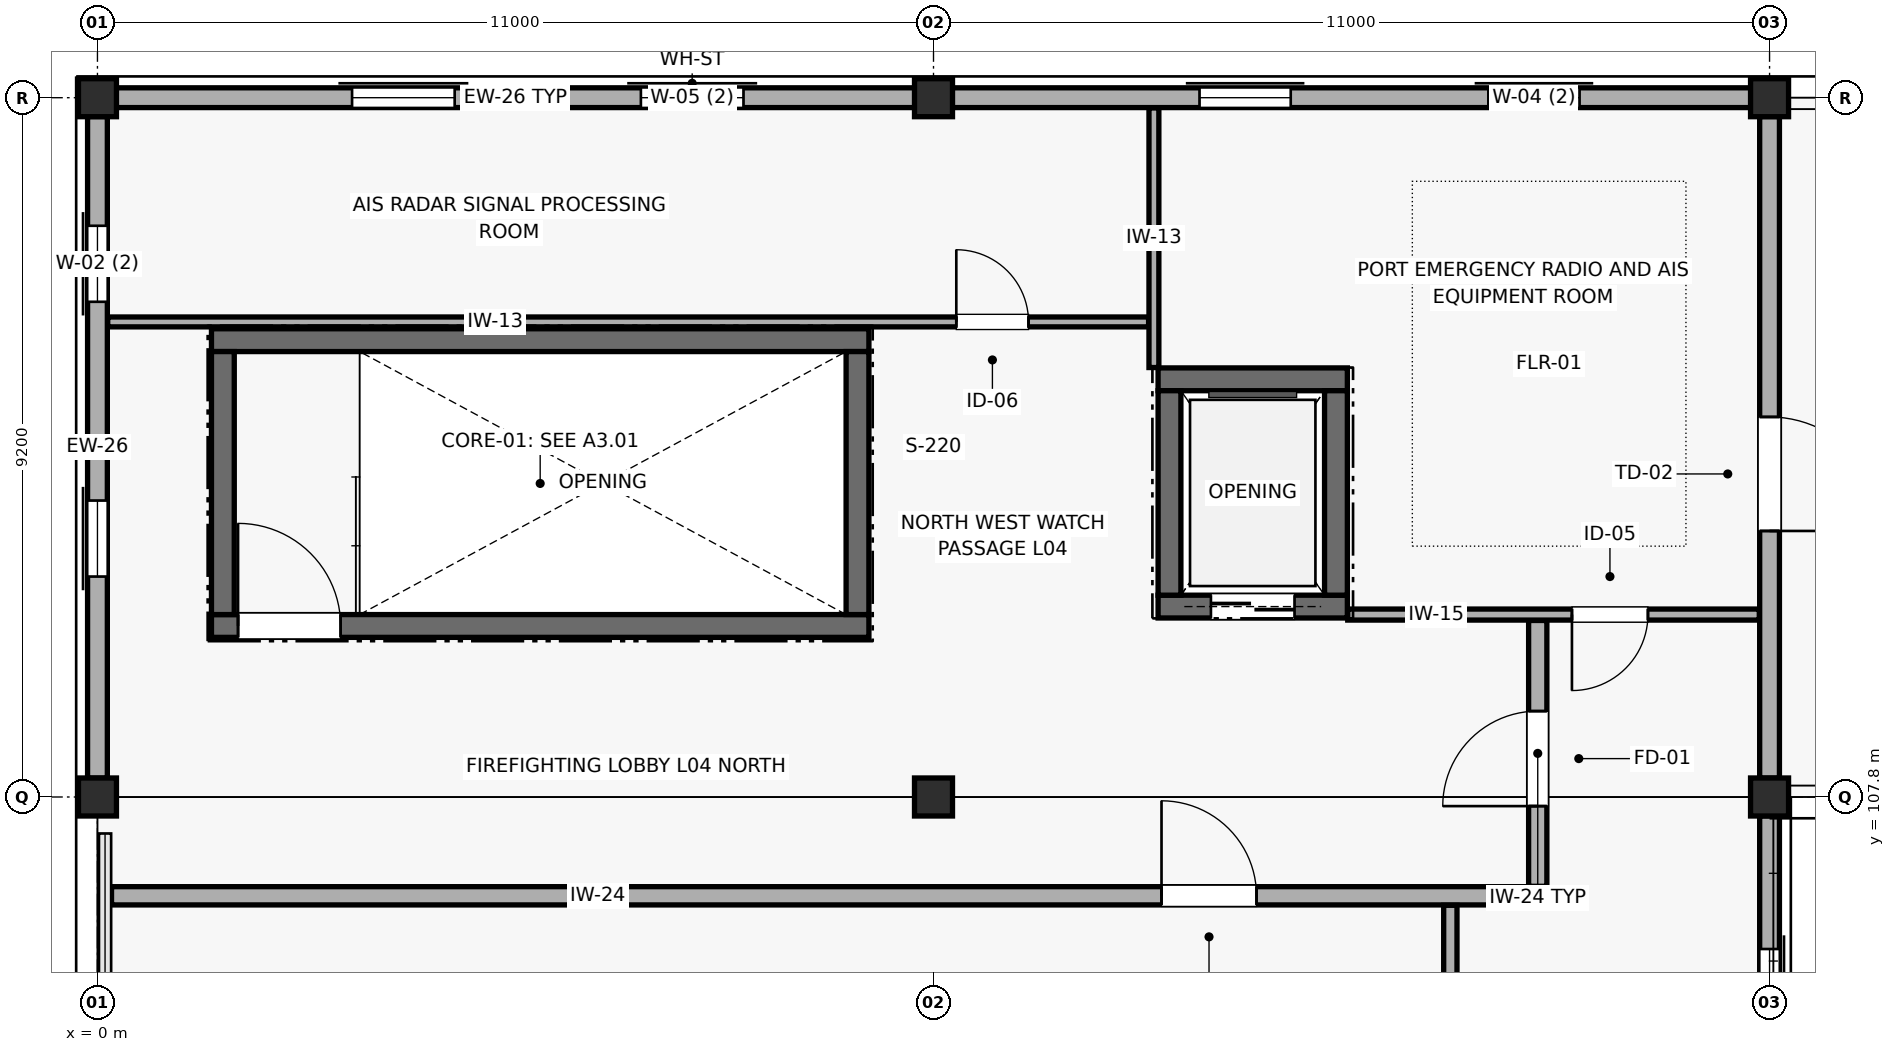
"""IFC4 building model, lengths in metres.
Left out: names, types, materials, properties, quantities, classifications, styles, units other than length and angle.
Written with IfcOpenShell. Run it as: python <this file> out.ifc"""

import sys

from ifc_helpers import new_model, si_unit, direction, frame, frame_2d, origin, origin_2d, place, context, subcontext, project, spatial, rectangle, extrude, element, fill, save


model = new_model("IFC4")
c1 = context("Model", 3, precision=1e-05, world=origin(), true_north=direction((0.0, 1.0)))
c2 = subcontext(c1, "Body", "Model", "MODEL_VIEW")
j1 = project(units=[si_unit("LENGTHUNIT", "METRE"), si_unit("PLANEANGLEUNIT", "RADIAN")], contexts=[c1])
p1 = place(None, origin())
s1 = spatial("IfcSite", under=j1, at=p1, CompositionType="ELEMENT")
p2 = place(p1, origin())
s2 = spatial("IfcBuilding", under=s1, at=p2, CompositionType="ELEMENT")
p3 = place(p2, frame((0.0, 0.0, 18.3)))
s3 = spatial("IfcBuildingStorey", under=s2, at=p3, CompositionType="ELEMENT", Elevation=18.3)
for number, where, z_axis, x_axis in (
    (1, (0.0, 107.8, 0.0), (0.0, 0.0, 1.0), (1.0, 0.0, 0.0)),
    (2, (0.0, 117.0, 0.0), (0.0, 0.0, 1.0), (1.0, 0.0, 0.0)),
    (3, (11.0, 107.8, 0.0), (0.0, 0.0, 1.0), (1.0, 0.0, 0.0)),
    (4, (11.0, 117.0, 0.0), (0.0, 0.0, 1.0), (1.0, 0.0, 0.0)),
    (5, (22.0, 107.8, 0.0), (0.0, 0.0, 1.0), (1.0, 0.0, 0.0)),
    (6, (22.0, 117.0, 0.0), (0.0, 0.0, 1.0), (1.0, 0.0, 0.0)),
):
    element("IfcColumn", number, at=place(p3, frame(where, z_axis=z_axis, x_axis=x_axis)), inside=s3, PredefinedType="COLUMN", context=c2, shape_type="SweptSolid", body=[
        extrude(rectangle(XDim=0.5, YDim=0.5, at=origin_2d()), origin(), (0.0, 0.0, 1.0), 4.2),
    ])
p4 = place(p3, frame((10.752, 117.0, 0.0), z_axis=(0.0, 0.0, 1.0), x_axis=(-1.0, 0.0, 0.0)))
e7 = element("IfcWall", 7, at=p4, inside=s3, PredefinedType="SOLIDWALL", context=c2, shape_type="SweptSolid", body=[
    extrude(rectangle(XDim=10.504, YDim=0.26, at=frame_2d((5.252, 0.0))), origin(), (0.0, 0.0, 1.0), 3.447),
])
p5 = place(p4, frame((2.252, 0.0, 0.95)))
e8 = element("IfcOpeningElement", 8, at=p5, cuts=e7, PredefinedType="OPENING", context=c2, shape_type="SweptSolid", body=[
    extrude(rectangle(XDim=1.35, YDim=2.1, at=frame_2d((0.675, 1.05))), frame((0.0, 0.14, 0.0), z_axis=(0.0, -1.0, 0.0), x_axis=(1.0, 0.0, 0.0)), (0.0, 0.0, 1.0), 0.28),
])
p6 = place(p4, frame((6.052, 0.0, 0.95)))
e9 = element("IfcOpeningElement", 9, at=p6, cuts=e7, PredefinedType="OPENING", context=c2, shape_type="SweptSolid", body=[
    extrude(rectangle(XDim=1.35, YDim=2.1, at=frame_2d((0.675, 1.05))), frame((0.0, 0.14, 0.0), z_axis=(0.0, -1.0, 0.0), x_axis=(1.0, 0.0, 0.0)), (0.0, 0.0, 1.0), 0.28),
])
p7 = place(p3, frame((21.752, 117.0, 0.0), z_axis=(0.0, 0.0, 1.0), x_axis=(-1.0, 0.0, 0.0)))
e10 = element("IfcWall", 10, at=p7, inside=s3, PredefinedType="SOLIDWALL", context=c2, shape_type="SweptSolid", body=[
    extrude(rectangle(XDim=10.504, YDim=0.26, at=frame_2d((5.252, 0.0))), origin(), (0.0, 0.0, 1.0), 3.447),
])
p8 = place(p7, frame((2.252, 0.0, 0.95)))
e11 = element("IfcOpeningElement", 11, at=p8, cuts=e10, PredefinedType="OPENING", context=c2, shape_type="SweptSolid", body=[
    extrude(rectangle(XDim=1.2, YDim=2.1, at=frame_2d((0.6, 1.05))), frame((0.0, 0.14, 0.0), z_axis=(0.0, -1.0, 0.0), x_axis=(1.0, 0.0, 0.0)), (0.0, 0.0, 1.0), 0.28),
])
p9 = place(p7, frame((6.052, 0.0, 0.95)))
e12 = element("IfcOpeningElement", 12, at=p9, cuts=e10, PredefinedType="OPENING", context=c2, shape_type="SweptSolid", body=[
    extrude(rectangle(XDim=1.2, YDim=2.1, at=frame_2d((0.6, 1.05))), frame((0.0, 0.14, 0.0), z_axis=(0.0, -1.0, 0.0), x_axis=(1.0, 0.0, 0.0)), (0.0, 0.0, 1.0), 0.28),
])
p10 = place(p3, frame((0.0, 116.752, 0.0), z_axis=(0.0, 0.0, 1.0), x_axis=(0.0, -1.0, 0.0)))
e13 = element("IfcWall", 13, at=p10, inside=s3, PredefinedType="SOLIDWALL", context=c2, shape_type="SweptSolid", body=[
    extrude(rectangle(XDim=8.704, YDim=0.26, at=frame_2d((4.352, 0.0))), origin(), (0.0, 0.0, 1.0), 3.449),
])
p11 = place(p10, frame((1.437, 0.0, 0.95)))
e14 = element("IfcOpeningElement", 14, at=p11, cuts=e13, PredefinedType="OPENING", context=c2, shape_type="SweptSolid", body=[
    extrude(rectangle(XDim=1.0, YDim=1.8, at=frame_2d((0.5, 0.9))), frame((0.0, 0.14, 0.0), z_axis=(0.0, -1.0, 0.0), x_axis=(1.0, 0.0, 0.0)), (0.0, 0.0, 1.0), 0.28),
])
p12 = place(p10, frame((5.052, 0.0, 0.95)))
e15 = element("IfcOpeningElement", 15, at=p12, cuts=e13, PredefinedType="OPENING", context=c2, shape_type="SweptSolid", body=[
    extrude(rectangle(XDim=1.0, YDim=1.8, at=frame_2d((0.5, 0.9))), frame((0.0, 0.14, 0.0), z_axis=(0.0, -1.0, 0.0), x_axis=(1.0, 0.0, 0.0)), (0.0, 0.0, 1.0), 0.28),
])
p13 = place(p3, frame((22.0, 98.848, 0.0), z_axis=(0.0, 0.0, 1.0), x_axis=(0.0, 1.0, 0.0)))
e16 = element("IfcWall", 16, at=p13, inside=s3, PredefinedType="SOLIDWALL", context=c2, shape_type="SweptSolid", body=[
    extrude(rectangle(XDim=8.704, YDim=0.26, at=frame_2d((4.352, 0.0))), origin(), (0.0, 0.0, 1.0), 3.449),
])
p14 = place(p13, frame((2.352, 0.0, 0.95)))
e17 = element("IfcOpeningElement", 17, at=p14, cuts=e16, PredefinedType="OPENING", context=c2, shape_type="SweptSolid", body=[
    extrude(rectangle(XDim=1.5, YDim=1.8, at=frame_2d((0.75, 0.9))), frame((0.0, 0.14, 0.0), z_axis=(0.0, -1.0, 0.0), x_axis=(1.0, 0.0, 0.0)), (0.0, 0.0, 1.0), 0.28),
])
p15 = place(p13, frame((5.452, 0.0, 0.95)))
e18 = element("IfcOpeningElement", 18, at=p15, cuts=e16, PredefinedType="OPENING", context=c2, shape_type="SweptSolid", body=[
    extrude(rectangle(XDim=1.5, YDim=1.8, at=frame_2d((0.75, 0.9))), frame((0.0, 0.14, 0.0), z_axis=(0.0, -1.0, 0.0), x_axis=(1.0, 0.0, 0.0)), (0.0, 0.0, 1.0), 0.28),
])
p16 = place(p3, frame((22.0, 108.048, 0.0), z_axis=(0.0, 0.0, 1.0), x_axis=(0.0, 1.0, 0.0)))
e19 = element("IfcWall", 19, at=p16, inside=s3, PredefinedType="SOLIDWALL", context=c2, shape_type="SweptSolid", body=[
    extrude(rectangle(XDim=8.704, YDim=0.26, at=frame_2d((4.352, 0.0))), origin(), (0.0, 0.0, 1.0), 3.449),
])
p17 = place(p16, frame((3.252, 0.0, 0.0)))
e20 = element("IfcOpeningElement", 20, at=p17, cuts=e19, PredefinedType="OPENING", context=c2, shape_type="SweptSolid", body=[
    extrude(rectangle(XDim=1.5, YDim=2.25, at=frame_2d((0.75, 1.125))), frame((0.0, 0.14, 0.0), z_axis=(0.0, -1.0, 0.0), x_axis=(1.0, 0.0, 0.0)), (0.0, 0.0, 1.0), 0.28),
])
p18 = place(p3, frame((1.5, 110.05, 0.0), z_axis=(0.0, 0.0, 1.0), x_axis=(1.0, 0.0, 0.0)))
e21 = element("IfcWall", 21, at=p18, inside=s3, PredefinedType="SHEAR", context=c2, shape_type="SweptSolid", body=[
    extrude(rectangle(XDim=8.65, YDim=0.3, at=frame_2d((4.325, 0.0))), origin(), (0.0, 0.0, 1.0), 3.99),
])
p19 = place(p18, frame((0.35, 0.0, 0.0)))
e22 = element("IfcOpeningElement", 22, at=p19, cuts=e21, PredefinedType="OPENING", context=c2, shape_type="SweptSolid", body=[
    extrude(rectangle(XDim=1.35, YDim=2.2, at=frame_2d((0.675, 1.1))), frame((0.0, 0.16, 0.0), z_axis=(0.0, -1.0, 0.0), x_axis=(1.0, 0.0, 0.0)), (0.0, 0.0, 1.0), 0.32),
])
p20 = place(p3, frame((10.15, 113.81, 0.0), z_axis=(0.0, 0.0, 1.0), x_axis=(-1.0, 0.0, 0.0)))
e23 = element("IfcWall", 23, at=p20, inside=s3, PredefinedType="SHEAR", context=c2, shape_type="SweptSolid", body=[
    extrude(rectangle(XDim=8.65, YDim=0.3, at=frame_2d((4.325, 0.0))), origin(), (0.0, 0.0, 1.0), 3.99),
])
for number, where, z_axis, x_axis in (
    (24, (1.65, 113.66, 0.0), (0.0, 0.0, 1.0), (0.0, -1.0, 0.0)),
    (25, (10.0, 110.2, 0.0), (0.0, 0.0, 1.0), (0.0, 1.0, 0.0)),
):
    element("IfcWall", number, at=place(p3, frame(where, z_axis=z_axis, x_axis=x_axis)), inside=s3, PredefinedType="SHEAR", context=c2, shape_type="SweptSolid", body=[
        extrude(rectangle(XDim=3.46, YDim=0.3, at=frame_2d((1.73, 0.0))), origin(), (0.0, 0.0, 1.0), 3.99),
    ])
p21 = place(p3, frame((13.955, 110.305, 0.0), z_axis=(0.0, 0.0, 1.0), x_axis=(1.0, 0.0, 0.0)))
e26 = element("IfcWall", 26, at=p21, inside=s3, PredefinedType="SHEAR", context=c2, shape_type="SweptSolid", body=[
    extrude(rectangle(XDim=2.49, YDim=0.3, at=frame_2d((1.245, 0.0))), origin(), (0.0, 0.0, 1.0), 3.99),
])
p22 = place(p21, frame((0.695, 0.0, 0.0)))
e27 = element("IfcOpeningElement", 27, at=p22, cuts=e26, PredefinedType="OPENING", context=c2, shape_type="SweptSolid", body=[
    extrude(rectangle(XDim=1.1, YDim=2.15, at=frame_2d((0.55, 1.075))), frame((0.0, 0.16, 0.0), z_axis=(0.0, -1.0, 0.0), x_axis=(1.0, 0.0, 0.0)), (0.0, 0.0, 1.0), 0.32),
])
p23 = place(p3, frame((16.445, 113.295, 0.0), z_axis=(0.0, 0.0, 1.0), x_axis=(-1.0, 0.0, 0.0)))
e28 = element("IfcWall", 28, at=p23, inside=s3, PredefinedType="SHEAR", context=c2, shape_type="SweptSolid", body=[
    extrude(rectangle(XDim=2.49, YDim=0.3, at=frame_2d((1.245, 0.0))), origin(), (0.0, 0.0, 1.0), 3.99),
])
for number, where, z_axis, x_axis in (
    (29, (14.105, 113.145, 0.0), (0.0, 0.0, 1.0), (0.0, -1.0, 0.0)),
    (30, (16.295, 110.455, 0.0), (0.0, 0.0, 1.0), (0.0, 1.0, 0.0)),
):
    element("IfcWall", number, at=place(p3, frame(where, z_axis=z_axis, x_axis=x_axis)), inside=s3, PredefinedType="SHEAR", context=c2, shape_type="SweptSolid", body=[
        extrude(rectangle(XDim=2.69, YDim=0.3, at=frame_2d((1.345, 0.0))), origin(), (0.0, 0.0, 1.0), 3.99),
    ])
p24 = place(p3, frame((0.185, 106.5, 0.0), z_axis=(0.0, 0.0, 1.0), x_axis=(1.0, 0.0, 0.0)))
e31 = element("IfcWall", 31, at=p24, inside=s3, PredefinedType="PARTITIONING", context=c2, shape_type="SweptSolid", body=[
    extrude(rectangle(XDim=18.64, YDim=0.24, at=frame_2d((9.32, 0.0))), origin(), (0.0, 0.0, 1.0), 3.449),
])
p25 = place(p24, frame((13.815, 0.0, 0.0)))
e32 = element("IfcOpeningElement", 32, at=p25, cuts=e31, PredefinedType="OPENING", context=c2, shape_type="SweptSolid", body=[
    extrude(rectangle(XDim=1.25, YDim=2.2, at=frame_2d((0.625, 1.1))), frame((0.0, 0.13, 0.0), z_axis=(0.0, -1.0, 0.0), x_axis=(1.0, 0.0, 0.0)), (0.0, 0.0, 1.0), 0.26),
])
p26 = place(p3, frame((17.8, 80.625, 0.0), z_axis=(0.0, 0.0, 1.0), x_axis=(0.0, 1.0, 0.0)))
e33 = element("IfcWall", 33, at=p26, inside=s3, PredefinedType="PARTITIONING", context=c2, shape_type="SweptSolid", body=[
    extrude(rectangle(XDim=25.75, YDim=0.175, at=frame_2d((12.875, 0.0))), origin(), (0.0, 0.0, 1.0), 3.447),
])
p27 = place(p26, frame((6.505, 0.0, 0.0)))
e34 = element("IfcOpeningElement", 34, at=p27, cuts=e33, PredefinedType="OPENING", context=c2, shape_type="SweptSolid", body=[
    extrude(rectangle(XDim=1.05, YDim=2.2, at=frame_2d((0.525, 1.1))), frame((0.0, 0.097, 0.0), z_axis=(0.0, -1.0, 0.0), x_axis=(1.0, 0.0, 0.0)), (0.0, 0.0, 1.0), 0.195),
])
p28 = place(p26, frame((19.805, 0.0, 0.0)))
e35 = element("IfcOpeningElement", 35, at=p28, cuts=e33, PredefinedType="OPENING", context=c2, shape_type="SweptSolid", body=[
    extrude(rectangle(XDim=1.0, YDim=2.15, at=frame_2d((0.5, 1.075))), frame((0.0, 0.097, 0.0), z_axis=(0.0, -1.0, 0.0), x_axis=(1.0, 0.0, 0.0)), (0.0, 0.0, 1.0), 0.195),
])
p29 = place(p3, frame((18.95, 106.625, 0.0), z_axis=(0.0, 0.0, 1.0), x_axis=(0.0, 1.0, 0.0)))
e36 = element("IfcWall", 36, at=p29, inside=s3, PredefinedType="PARTITIONING", context=c2, shape_type="SweptSolid", body=[
    extrude(rectangle(XDim=3.498, YDim=0.24, at=frame_2d((1.749, 0.0))), origin(), (0.0, 0.0, 1.0), 3.447),
])
p30 = place(p29, frame((1.055, 0.0, 0.0)))
e37 = element("IfcOpeningElement", 37, at=p30, cuts=e36, PredefinedType="OPENING", context=c2, shape_type="SweptSolid", body=[
    extrude(rectangle(XDim=1.25, YDim=2.2, at=frame_2d((0.625, 1.1))), frame((0.0, 0.13, 0.0), z_axis=(0.0, -1.0, 0.0), x_axis=(1.0, 0.0, 0.0)), (0.0, 0.0, 1.0), 0.26),
])
p31 = place(p3, frame((0.135, 114.05, 0.0), z_axis=(0.0, 0.0, 1.0), x_axis=(1.0, 0.0, 0.0)))
e38 = element("IfcWall", 38, at=p31, inside=s3, PredefinedType="PARTITIONING", context=c2, shape_type="SweptSolid", body=[
    extrude(rectangle(XDim=13.695, YDim=0.13, at=frame_2d((6.848, 0.0))), origin(), (0.0, 0.0, 1.0), 3.449),
])
p32 = place(p31, frame((11.165, 0.0, 0.0)))
e39 = element("IfcOpeningElement", 39, at=p32, cuts=e38, PredefinedType="OPENING", context=c2, shape_type="SweptSolid", body=[
    extrude(rectangle(XDim=0.95, YDim=2.15, at=frame_2d((0.475, 1.075))), frame((0.0, 0.075, 0.0), z_axis=(0.0, -1.0, 0.0), x_axis=(1.0, 0.0, 0.0)), (0.0, 0.0, 1.0), 0.15),
])
p33 = place(p3, frame((13.9, 113.45, 0.0), z_axis=(0.0, 0.0, 1.0), x_axis=(0.0, 1.0, 0.0)))
e40 = element("IfcWall", 40, at=p33, inside=s3, PredefinedType="PARTITIONING", context=c2, shape_type="SweptSolid", body=[
    extrude(rectangle(XDim=3.415, YDim=0.13, at=frame_2d((1.708, 0.0))), origin(), (0.0, 0.0, 1.0), 3.678),
])
p34 = place(p3, frame((16.45, 110.2, 0.0), z_axis=(0.0, 0.0, 1.0), x_axis=(1.0, 0.0, 0.0)))
e41 = element("IfcWall", 41, at=p34, inside=s3, PredefinedType="PARTITIONING", context=c2, shape_type="SweptSolid", body=[
    extrude(rectangle(XDim=5.415, YDim=0.145, at=frame_2d((2.708, 0.0))), origin(), (0.0, 0.0, 1.0), 3.99),
])
p35 = place(p34, frame((2.95, 0.0, 0.0)))
e42 = element("IfcOpeningElement", 42, at=p35, cuts=e41, PredefinedType="OPENING", context=c2, shape_type="SweptSolid", body=[
    extrude(rectangle(XDim=1.0, YDim=2.15, at=frame_2d((0.5, 1.075))), frame((0.0, 0.083, 0.0), z_axis=(0.0, -1.0, 0.0), x_axis=(1.0, 0.0, 0.0)), (0.0, 0.0, 1.0), 0.165),
])
p36 = place(p5, origin())
e43 = element("IfcWindow", 43, at=p36, inside=s3, PartitioningType="SINGLE_PANEL", PredefinedType="WINDOW", context=c2, shape_type="SweptSolid", body=[
    extrude(rectangle(XDim=1.35, YDim=2.1, at=frame_2d((0.675, 1.05))), frame((0.0, 0.03, 0.0), z_axis=(0.0, -1.0, 0.0), x_axis=(1.0, 0.0, 0.0)), (0.0, 0.0, 1.0), 0.06),
])
fill(e8, e43)
p37 = place(p6, origin())
e44 = element("IfcWindow", 44, at=p37, inside=s3, PartitioningType="SINGLE_PANEL", PredefinedType="WINDOW", context=c2, shape_type="SweptSolid", body=[
    extrude(rectangle(XDim=1.35, YDim=2.1, at=frame_2d((0.675, 1.05))), frame((0.0, 0.03, 0.0), z_axis=(0.0, -1.0, 0.0), x_axis=(1.0, 0.0, 0.0)), (0.0, 0.0, 1.0), 0.06),
])
fill(e9, e44)
p38 = place(p8, origin())
e45 = element("IfcWindow", 45, at=p38, inside=s3, PartitioningType="SINGLE_PANEL", PredefinedType="WINDOW", context=c2, shape_type="SweptSolid", body=[
    extrude(rectangle(XDim=1.2, YDim=2.1, at=frame_2d((0.6, 1.05))), frame((0.0, 0.03, 0.0), z_axis=(0.0, -1.0, 0.0), x_axis=(1.0, 0.0, 0.0)), (0.0, 0.0, 1.0), 0.06),
])
fill(e11, e45)
p39 = place(p9, origin())
e46 = element("IfcWindow", 46, at=p39, inside=s3, PartitioningType="SINGLE_PANEL", PredefinedType="WINDOW", context=c2, shape_type="SweptSolid", body=[
    extrude(rectangle(XDim=1.2, YDim=2.1, at=frame_2d((0.6, 1.05))), frame((0.0, 0.03, 0.0), z_axis=(0.0, -1.0, 0.0), x_axis=(1.0, 0.0, 0.0)), (0.0, 0.0, 1.0), 0.06),
])
fill(e12, e46)
p40 = place(p11, origin())
e47 = element("IfcWindow", 47, at=p40, inside=s3, PartitioningType="SINGLE_PANEL", PredefinedType="WINDOW", context=c2, shape_type="SweptSolid", body=[
    extrude(rectangle(XDim=1.0, YDim=1.8, at=frame_2d((0.5, 0.9))), frame((0.0, 0.03, 0.0), z_axis=(0.0, -1.0, 0.0), x_axis=(1.0, 0.0, 0.0)), (0.0, 0.0, 1.0), 0.06),
])
fill(e14, e47)
p41 = place(p12, origin())
e48 = element("IfcWindow", 48, at=p41, inside=s3, PartitioningType="SINGLE_PANEL", PredefinedType="WINDOW", context=c2, shape_type="SweptSolid", body=[
    extrude(rectangle(XDim=1.0, YDim=1.8, at=frame_2d((0.5, 0.9))), frame((0.0, 0.03, 0.0), z_axis=(0.0, -1.0, 0.0), x_axis=(1.0, 0.0, 0.0)), (0.0, 0.0, 1.0), 0.06),
])
fill(e15, e48)
p42 = place(p15, origin())
e49 = element("IfcWindow", 49, at=p42, inside=s3, PartitioningType="SINGLE_PANEL", PredefinedType="WINDOW", context=c2, shape_type="SweptSolid", body=[
    extrude(rectangle(XDim=1.5, YDim=1.8, at=frame_2d((0.75, 0.9))), frame((0.0, 0.03, 0.0), z_axis=(0.0, -1.0, 0.0), x_axis=(1.0, 0.0, 0.0)), (0.0, 0.0, 1.0), 0.06),
])
fill(e18, e49)
p43 = place(p17, frame((1.5, 0.0, 0.0), z_axis=(0.0, 0.0, 1.0), x_axis=(-1.0, 0.0, 0.0)))
e50 = element("IfcDoor", 50, at=p43, inside=s3, OperationType="SINGLE_SWING_RIGHT", PredefinedType="DOOR", context=c2, shape_type="SweptSolid", body=[
    extrude(rectangle(XDim=1.5, YDim=2.25, at=frame_2d((0.75, 1.125))), frame((0.0, 0.025, 0.0), z_axis=(0.0, -1.0, 0.0), x_axis=(1.0, 0.0, 0.0)), (0.0, 0.0, 1.0), 0.05),
])
fill(e20, e50)
p44 = place(p19, origin())
e51 = element("IfcDoor", 51, at=p44, inside=s3, OperationType="SINGLE_SWING_LEFT", PredefinedType="DOOR", context=c2, shape_type="SweptSolid", body=[
    extrude(rectangle(XDim=1.35, YDim=2.2, at=frame_2d((0.675, 1.1))), frame((0.0, 0.025, 0.0), z_axis=(0.0, -1.0, 0.0), x_axis=(1.0, 0.0, 0.0)), (0.0, 0.0, 1.0), 0.05),
])
fill(e22, e51)
p45 = place(p22, frame((1.1, 0.0, 0.0), z_axis=(0.0, 0.0, 1.0), x_axis=(-1.0, 0.0, 0.0)))
e52 = element("IfcDoor", 52, at=p45, inside=s3, OperationType="DOUBLE_DOOR_SLIDING", PredefinedType="DOOR", context=c2, shape_type="SweptSolid", body=[
    extrude(rectangle(XDim=1.1, YDim=2.15, at=frame_2d((0.55, 1.075))), frame((0.0, 0.025, 0.0), z_axis=(0.0, -1.0, 0.0), x_axis=(1.0, 0.0, 0.0)), (0.0, 0.0, 1.0), 0.05),
])
fill(e27, e52)
p46 = place(p25, origin())
e53 = element("IfcDoor", 53, at=p46, inside=s3, OperationType="SINGLE_SWING_LEFT", PredefinedType="DOOR", context=c2, shape_type="SweptSolid", body=[
    extrude(rectangle(XDim=1.25, YDim=2.2, at=frame_2d((0.625, 1.1))), frame((0.0, 0.025, 0.0), z_axis=(0.0, -1.0, 0.0), x_axis=(1.0, 0.0, 0.0)), (0.0, 0.0, 1.0), 0.05),
])
fill(e32, e53)
p47 = place(p30, origin())
e54 = element("IfcDoor", 54, at=p47, inside=s3, OperationType="SINGLE_SWING_LEFT", PredefinedType="DOOR", context=c2, shape_type="SweptSolid", body=[
    extrude(rectangle(XDim=1.25, YDim=2.2, at=frame_2d((0.625, 1.1))), frame((0.0, 0.025, 0.0), z_axis=(0.0, -1.0, 0.0), x_axis=(1.0, 0.0, 0.0)), (0.0, 0.0, 1.0), 0.05),
])
fill(e37, e54)
p48 = place(p32, origin())
e55 = element("IfcDoor", 55, at=p48, inside=s3, OperationType="SINGLE_SWING_LEFT", PredefinedType="DOOR", context=c2, shape_type="SweptSolid", body=[
    extrude(rectangle(XDim=0.95, YDim=2.15, at=frame_2d((0.475, 1.075))), frame((0.0, 0.025, 0.0), z_axis=(0.0, -1.0, 0.0), x_axis=(1.0, 0.0, 0.0)), (0.0, 0.0, 1.0), 0.05),
])
fill(e39, e55)
p49 = place(p35, frame((1.0, 0.0, 0.0), z_axis=(0.0, 0.0, 1.0), x_axis=(-1.0, 0.0, 0.0)))
e56 = element("IfcDoor", 56, at=p49, inside=s3, OperationType="SINGLE_SWING_RIGHT", PredefinedType="DOOR", context=c2, shape_type="SweptSolid", body=[
    extrude(rectangle(XDim=1.0, YDim=2.15, at=frame_2d((0.5, 1.075))), frame((0.0, 0.025, 0.0), z_axis=(0.0, -1.0, 0.0), x_axis=(1.0, 0.0, 0.0)), (0.0, 0.0, 1.0), 0.05),
])
fill(e42, e56)
save(model, sys.argv[1])
